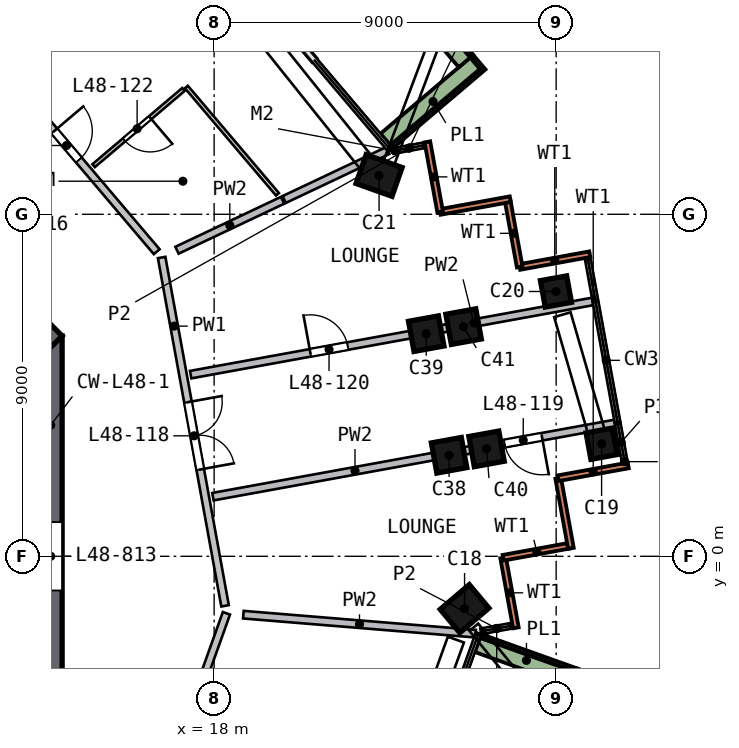
"""IFC4 building model, lengths in metres.
Left out: names, types, materials, properties, quantities, classifications, styles, units other than length and angle.
Written with IfcOpenShell. Run it as: python <this file> out.ifc"""

import sys

from ifc_helpers import new_model, si_unit, direction, frame, frame_2d, origin, origin_2d, place, context, subcontext, project, spatial, rectangle, extrude, element, fill, save


model = new_model("IFC4")
c1 = context("Model", 3, precision=1e-05, world=origin(), true_north=direction((0.0, 1.0)))
c2 = subcontext(c1, "Body", "Model", "MODEL_VIEW")
j1 = project(units=[si_unit("LENGTHUNIT", "METRE"), si_unit("PLANEANGLEUNIT", "RADIAN")], contexts=[c1])
p1 = place(None, origin())
s1 = spatial("IfcSite", under=j1, at=p1, CompositionType="ELEMENT")
p2 = place(p1, origin())
s2 = spatial("IfcBuilding", under=s1, at=p2, CompositionType="ELEMENT")
p3 = place(p2, frame((0.0, 0.0, 197.5)))
s3 = spatial("IfcBuildingStorey", under=s2, at=p3, CompositionType="ELEMENT", Elevation=197.5)
p4 = place(p3, frame((24.582, -1.521, 0.0), z_axis=(0.006232678, 0.116900718, 0.993124049), x_axis=(-0.764322175, -0.639838763, 0.080112233)))
e1 = element("IfcColumn", 1, at=p4, inside=s3, PredefinedType="COLUMN", context=c2, shape_type="SweptSolid", body=[
    extrude(rectangle(XDim=1.0, YDim=0.8, at=origin_2d()), origin(), (0.0, 0.0, 1.0), 3.212),
])
p5 = place(p3, frame((28.213, 2.8, 0.0), z_axis=(-0.014333646, 0.133704853, 0.990917534), x_axis=(-0.178356064, 0.974784174, -0.134107898)))
e2 = element("IfcColumn", 2, at=p5, inside=s3, PredefinedType="COLUMN", context=c2, shape_type="SweptSolid", body=[
    extrude(rectangle(XDim=0.7, YDim=0.7, at=origin_2d()), origin(), (0.0, 0.0, 1.0), 3.219),
])
p6 = place(p3, frame((27.035, 6.813, 0.0), z_axis=(-0.033455127, 0.127979135, 0.991212437), x_axis=(-0.176699521, 0.975386965, -0.131899763)))
e3 = element("IfcColumn", 3, at=p6, inside=s3, PredefinedType="COLUMN", context=c2, shape_type="SweptSolid", body=[
    extrude(rectangle(XDim=0.7, YDim=0.7, at=origin_2d()), origin(), (0.0, 0.0, 1.0), 3.218),
])
p7 = place(p3, frame((22.398, 9.893, 0.0), z_axis=(-0.047964708, 0.106115266, 0.993196324), x_axis=(0.940870573, -0.329039999, 0.080593079)))
e4 = element("IfcColumn", 4, at=p7, inside=s3, PredefinedType="COLUMN", context=c2, shape_type="SweptSolid", body=[
    extrude(rectangle(XDim=1.0, YDim=0.8, at=origin_2d()), origin(), (0.0, 0.0, 1.0), 3.212),
])
for number, where, z_axis, x_axis in (
    (5, (24.198, 2.519, 0.0), (-0.013, 0.115, 0.993), (0.984, 0.178, -0.008)),
    (6, (23.615, 5.723, 0.0), (-0.028, 0.112, 0.993), (0.984, 0.18, 0.008)),
):
    element("IfcColumn", number, at=place(p3, frame(where, z_axis=z_axis, x_axis=x_axis)), inside=s3, PredefinedType="COLUMN", context=c2, shape_type="SweptSolid", body=[
        extrude(rectangle(XDim=0.8, YDim=0.8, at=origin_2d()), origin(), (0.0, 0.0, 1.0), 3.211),
    ])
p8 = place(p3, frame((25.185, 2.682, 0.0), z_axis=(-0.013751888, 0.11966422, 0.992719175), x_axis=(0.983970963, 0.17815613, -0.007844571)))
e7 = element("IfcColumn", 7, at=p8, inside=s3, PredefinedType="COLUMN", context=c2, shape_type="SweptSolid", body=[
    extrude(rectangle(XDim=0.8, YDim=0.8, at=origin_2d()), origin(), (0.0, 0.0, 1.0), 3.213),
])
p9 = place(p3, frame((24.599, 5.902, 0.0), z_axis=(-0.029024263, 0.116628912, 0.992751373), x_axis=(0.983622156, 0.180082416, 0.007601191)))
e8 = element("IfcColumn", 8, at=p9, inside=s3, PredefinedType="COLUMN", context=c2, shape_type="SweptSolid", body=[
    extrude(rectangle(XDim=0.8, YDim=0.8, at=origin_2d()), origin(), (0.0, 0.0, 1.0), 3.213),
])
p10 = place(p3, frame((13.7, -5.799, 0.0), z_axis=(0.0, 0.0, 1.0), x_axis=(0.0, 1.0, 0.0)))
e9 = element("IfcWall", 9, at=p10, inside=s3, PredefinedType="SHEAR", context=c2, shape_type="SweptSolid", body=[
    extrude(rectangle(XDim=11.598, YDim=0.6, at=frame_2d((5.799, 0.0))), origin(), (0.0, 0.0, 1.0), 3.5),
])
p11 = place(p10, frame((4.899, 0.0, 0.0)))
e10 = element("IfcOpeningElement", 10, at=p11, cuts=e9, PredefinedType="OPENING", context=c2, shape_type="SweptSolid", body=[
    extrude(rectangle(XDim=1.8, YDim=2.1, at=frame_2d((0.9, 1.05))), frame((0.0, 0.31, 0.0), z_axis=(0.0, -1.0, 0.0), x_axis=(1.0, 0.0, 0.0)), (0.0, 0.0, 1.0), 0.62),
])
p12 = place(p3, frame((13.788, 5.587, 0.0), z_axis=(0.0, 0.0, 1.0), x_axis=(-0.707106781, 0.707106781, 0.0)))
e11 = element("IfcWall", 11, at=p12, inside=s3, PredefinedType="SHEAR", context=c2, shape_type="SweptSolid", body=[
    extrude(rectangle(XDim=11.598, YDim=0.6, at=frame_2d((5.799, 0.0))), origin(), (0.0, 0.0, 1.0), 3.5),
])
p13 = place(p12, frame((2.099, 0.0, 0.0)))
e12 = element("IfcOpeningElement", 12, at=p13, cuts=e11, PredefinedType="OPENING", context=c2, shape_type="SweptSolid", body=[
    extrude(rectangle(XDim=1.2, YDim=2.1, at=frame_2d((0.6, 1.05))), frame((0.0, 0.31, 0.0), z_axis=(0.0, -1.0, 0.0), x_axis=(1.0, 0.0, 0.0)), (0.0, 0.0, 1.0), 0.62),
])
p14 = place(p3, frame((25.94, -1.883, 0.0), z_axis=(0.0, 0.0, 1.0), x_axis=(-0.179160422, 0.983819873, 0.0)))
e13 = element("IfcWall", 13, at=p14, inside=s3, PredefinedType="SOLIDWALL", context=c2, shape_type="SweptSolid", body=[
    extrude(rectangle(XDim=1.875, YDim=0.15, at=frame_2d((0.938, 0.0))), origin(), (0.0, 0.0, 1.0), 3.19),
])
p15 = place(p3, frame((25.604, -0.039, 0.0), z_axis=(0.0, 0.0, 1.0), x_axis=(0.983839511, 0.179052551, 0.0)))
e14 = element("IfcWall", 14, at=p15, inside=s3, PredefinedType="SOLIDWALL", context=c2, shape_type="SweptSolid", body=[
    extrude(rectangle(XDim=1.8, YDim=0.15, at=frame_2d((0.9, 0.0))), origin(), (0.0, 0.0, 1.0), 3.19),
])
p16 = place(p3, frame((27.389, 0.21, 0.0), z_axis=(0.0, 0.0, 1.0), x_axis=(-0.179034393, 0.983842816, 0.0)))
e15 = element("IfcWall", 15, at=p16, inside=s3, PredefinedType="SOLIDWALL", context=c2, shape_type="SweptSolid", body=[
    extrude(rectangle(XDim=1.875, YDim=0.15, at=frame_2d((0.938, 0.0))), origin(), (0.0, 0.0, 1.0), 3.19),
])
p17 = place(p3, frame((27.053, 2.055, 0.0), z_axis=(0.0, 0.0, 1.0), x_axis=(0.983815693, 0.179183374, 0.0)))
e16 = element("IfcWall", 16, at=p17, inside=s3, PredefinedType="SOLIDWALL", context=c2, shape_type="SweptSolid", body=[
    extrude(rectangle(XDim=1.875, YDim=0.15, at=frame_2d((0.938, 0.0))), origin(), (0.0, 0.0, 1.0), 3.19),
])
p18 = place(p3, frame((27.885, 7.949, 0.0), z_axis=(0.0, 0.0, 1.0), x_axis=(-0.983819873, -0.179160422, 0.0)))
e17 = element("IfcWall", 17, at=p18, inside=s3, PredefinedType="SOLIDWALL", context=c2, shape_type="SweptSolid", body=[
    extrude(rectangle(XDim=1.875, YDim=0.15, at=frame_2d((0.938, 0.0))), origin(), (0.0, 0.0, 1.0), 3.19),
])
p19 = place(p3, frame((26.041, 7.613, 0.0), z_axis=(0.0, 0.0, 1.0), x_axis=(-0.179183844, 0.983815608, 0.0)))
e18 = element("IfcWall", 18, at=p19, inside=s3, PredefinedType="SOLIDWALL", context=c2, shape_type="SweptSolid", body=[
    extrude(rectangle(XDim=1.8, YDim=0.15, at=frame_2d((0.9, 0.0))), origin(), (0.0, 0.0, 1.0), 3.19),
])
p20 = place(p3, frame((25.792, 9.397, 0.0), z_axis=(0.0, 0.0, 1.0), x_axis=(-0.983842816, -0.179034393, 0.0)))
e19 = element("IfcWall", 19, at=p20, inside=s3, PredefinedType="SOLIDWALL", context=c2, shape_type="SweptSolid", body=[
    extrude(rectangle(XDim=1.875, YDim=0.15, at=frame_2d((0.938, 0.0))), origin(), (0.0, 0.0, 1.0), 3.19),
])
p21 = place(p3, frame((23.947, 9.062, 0.0), z_axis=(0.0, 0.0, 1.0), x_axis=(-0.179057331, 0.983838641, 0.0)))
e20 = element("IfcWall", 20, at=p21, inside=s3, PredefinedType="SOLIDWALL", context=c2, shape_type="SweptSolid", body=[
    extrude(rectangle(XDim=1.875, YDim=0.15, at=frame_2d((0.938, 0.0))), origin(), (0.0, 0.0, 1.0), 3.19),
])
p22 = place(p3, frame((20.638, 13.056, 0.0), z_axis=(0.0, 0.0, 1.0), x_axis=(-0.647052089, 0.762445797, 0.0)))
e21 = element("IfcWall", 21, at=p22, inside=s3, PredefinedType="SOLIDWALL", context=c2, shape_type="SweptSolid", body=[
    extrude(rectangle(XDim=3.4, YDim=0.15, at=frame_2d((1.7, 0.0))), origin(), (0.0, 0.0, 1.0), 2.475),
])
p23 = place(p22, frame((0.4, 0.0, 0.0)))
e22 = element("IfcOpeningElement", 22, at=p23, cuts=e21, PredefinedType="OPENING", context=c2, shape_type="SweptSolid", body=[
    extrude(rectangle(XDim=2.4, YDim=2.4, at=frame_2d((1.2, 1.2))), frame((0.0, 0.085, 0.0), z_axis=(0.0, -1.0, 0.0), x_axis=(1.0, 0.0, 0.0)), (0.0, 0.0, 1.0), 0.17),
])
p24 = place(p3, frame((27.489, -3.194, 0.0), z_axis=(0.0, 0.0, 1.0), x_axis=(-0.94159448, 0.336748919, 0.0)))
e23 = element("IfcWall", 23, at=p24, inside=s3, PredefinedType="SOLIDWALL", context=c2, shape_type="SweptSolid", body=[
    extrude(rectangle(XDim=2.699, YDim=0.5, at=frame_2d((1.35, 0.0))), origin(), (0.0, 0.0, 1.0), 0.7),
])
p25 = place(p3, frame((22.541, 10.932, 0.0), z_axis=(0.0, 0.0, 1.0), x_axis=(0.762447521, 0.647050058, 0.0)))
e24 = element("IfcWall", 24, at=p25, inside=s3, PredefinedType="SOLIDWALL", context=c2, shape_type="SweptSolid", body=[
    extrude(rectangle(XDim=3.199, YDim=0.5, at=frame_2d((1.6, 0.0))), origin(), (0.0, 0.0, 1.0), 0.7),
])
p26 = place(p3, frame((24.627, 13.031, 0.0), z_axis=(0.0, 0.0, 1.0), x_axis=(-0.647062996, 0.762436541, 0.0)))
e25 = element("IfcWall", 25, at=p26, inside=s3, PredefinedType="SOLIDWALL", context=c2, shape_type="SweptSolid", body=[
    extrude(rectangle(XDim=13.223, YDim=0.5, at=frame_2d((6.612, 0.0))), origin(), (0.0, 0.0, 1.0), 0.7),
])
p27 = place(p3, frame((10.461, 15.118, 0.0), z_axis=(0.0, 0.0, 1.0), x_axis=(0.647056399, -0.76244214, 0.0)))
e26 = element("IfcWall", 26, at=p27, inside=s3, PredefinedType="SOLIDWALL", context=c2, shape_type="SweptSolid", body=[
    extrude(rectangle(XDim=9.316, YDim=0.2, at=frame_2d((4.658, 0.0))), origin(), (0.0, 0.0, 1.0), 3.19),
])
p28 = place(p27, frame((5.15, 0.0, 0.0)))
e27 = element("IfcOpeningElement", 27, at=p28, cuts=e26, PredefinedType="OPENING", context=c2, shape_type="SweptSolid", body=[
    extrude(rectangle(XDim=1.0, YDim=2.1, at=frame_2d((0.5, 1.05))), frame((0.0, 0.11, 0.0), z_axis=(0.0, -1.0, 0.0), x_axis=(1.0, 0.0, 0.0)), (0.0, 0.0, 1.0), 0.22),
])
p29 = place(p3, frame((18.323, -1.5, 0.0), z_axis=(0.0, 0.0, 1.0), x_axis=(-0.336758012, -0.941591228, 0.0)))
e28 = element("IfcWall", 28, at=p29, inside=s3, PredefinedType="SOLIDWALL", context=c2, shape_type="SweptSolid", body=[
    extrude(rectangle(XDim=9.317, YDim=0.2, at=frame_2d((4.658, 0.0))), origin(), (0.0, 0.0, 1.0), 3.19),
])
p30 = place(p29, frame((5.15, 0.0, 0.0)))
e29 = element("IfcOpeningElement", 29, at=p30, cuts=e28, PredefinedType="OPENING", context=c2, shape_type="SweptSolid", body=[
    extrude(rectangle(XDim=1.0, YDim=2.1, at=frame_2d((0.5, 1.05))), frame((0.0, 0.11, 0.0), z_axis=(0.0, -1.0, 0.0), x_axis=(1.0, 0.0, 0.0)), (0.0, 0.0, 1.0), 0.22),
])
p31 = place(p3, frame((16.619, 7.863, 0.0), z_axis=(0.0, 0.0, 1.0), x_axis=(0.179134481, -0.983824597, 0.0)))
e30 = element("IfcWall", 30, at=p31, inside=s3, PredefinedType="SOLIDWALL", context=c2, shape_type="SweptSolid", body=[
    extrude(rectangle(XDim=9.317, YDim=0.2, at=frame_2d((4.658, 0.0))), origin(), (0.0, 0.0, 1.0), 3.19),
])
p32 = place(p31, frame((3.869, 0.0, 0.0)))
e31 = element("IfcOpeningElement", 31, at=p32, cuts=e30, PredefinedType="OPENING", context=c2, shape_type="SweptSolid", body=[
    extrude(rectangle(XDim=1.8, YDim=2.1, at=frame_2d((0.9, 1.05))), frame((0.0, 0.11, 0.0), z_axis=(0.0, -1.0, 0.0), x_axis=(1.0, 0.0, 0.0)), (0.0, 0.0, 1.0), 0.22),
])
p33 = place(p3, frame((17.023, 8.054, 0.0), z_axis=(0.0, 0.0, 1.0), x_axis=(0.903934995, 0.427669877, 0.0)))
e32 = element("IfcWall", 32, at=p33, inside=s3, PredefinedType="SOLIDWALL", context=c2, shape_type="SweptSolid", body=[
    extrude(rectangle(XDim=3.075, YDim=0.2, at=frame_2d((1.537, 0.0))), origin(), (0.0, 0.0, 1.0), 3.19),
])
p34 = place(p3, frame((19.844, 9.389, 0.0), z_axis=(0.0, 0.0, 1.0), x_axis=(0.90394408, 0.427650675, 0.0)))
e33 = element("IfcWall", 33, at=p34, inside=s3, PredefinedType="SOLIDWALL", context=c2, shape_type="SweptSolid", body=[
    extrude(rectangle(XDim=3.011, YDim=0.2, at=frame_2d((1.506, 0.0))), origin(), (0.0, 0.0, 1.0), 3.19),
])
p35 = place(p3, frame((24.881, -2.037, 0.0), z_axis=(0.0, 0.0, 1.0), x_axis=(-0.996666868, 0.081579132, 0.0)))
e34 = element("IfcWall", 34, at=p35, inside=s3, PredefinedType="SOLIDWALL", context=c2, shape_type="SweptSolid", body=[
    extrude(rectangle(XDim=6.132, YDim=0.2, at=frame_2d((3.066, 0.0))), origin(), (0.0, 0.0, 1.0), 3.19),
])
p36 = place(p3, frame((17.383, 4.781, 0.0), z_axis=(0.0, 0.0, 1.0), x_axis=(0.983822637, 0.179145247, 0.0)))
e35 = element("IfcWall", 35, at=p36, inside=s3, PredefinedType="SOLIDWALL", context=c2, shape_type="SweptSolid", body=[
    extrude(rectangle(XDim=10.75, YDim=0.2, at=frame_2d((5.375, 0.0))), origin(), (0.0, 0.0, 1.0), 3.19),
])
p37 = place(p36, frame((3.2, 0.0, 0.0)))
e36 = element("IfcOpeningElement", 36, at=p37, cuts=e35, PredefinedType="OPENING", context=c2, shape_type="SweptSolid", body=[
    extrude(rectangle(XDim=1.0, YDim=2.1, at=frame_2d((0.5, 1.05))), frame((0.0, 0.11, 0.0), z_axis=(0.0, -1.0, 0.0), x_axis=(1.0, 0.0, 0.0)), (0.0, 0.0, 1.0), 0.22),
])
p38 = place(p3, frame((28.544, 3.494, 0.0), z_axis=(0.0, 0.0, 1.0), x_axis=(-0.983823366, -0.179141244, 0.0)))
e37 = element("IfcWall", 37, at=p38, inside=s3, PredefinedType="SOLIDWALL", context=c2, shape_type="SweptSolid", body=[
    extrude(rectangle(XDim=10.75, YDim=0.2, at=frame_2d((5.375, 0.0))), origin(), (0.0, 0.0, 1.0), 3.19),
])
p39 = place(p38, frame((1.95, 0.0, 0.0)))
e38 = element("IfcOpeningElement", 38, at=p39, cuts=e37, PredefinedType="OPENING", context=c2, shape_type="SweptSolid", body=[
    extrude(rectangle(XDim=1.0, YDim=2.1, at=frame_2d((0.5, 1.05))), frame((0.0, 0.11, 0.0), z_axis=(0.0, -1.0, 0.0), x_axis=(1.0, 0.0, 0.0)), (0.0, 0.0, 1.0), 0.22),
])
p40 = place(p3, frame((17.194, 12.285, 0.0), z_axis=(0.0, 0.0, 1.0), x_axis=(-0.762432611, -0.647067627, 0.0)))
e39 = element("IfcWall", 39, at=p40, inside=s3, PredefinedType="PARTITIONING", context=c2, shape_type="SweptSolid", body=[
    extrude(rectangle(XDim=3.1, YDim=0.1, at=frame_2d((1.55, 0.0))), origin(), (0.0, 0.0, 1.0), 3.19),
])
p41 = place(p40, frame((1.15, 0.0, 0.0)))
e40 = element("IfcOpeningElement", 40, at=p41, cuts=e39, PredefinedType="OPENING", context=c2, shape_type="SweptSolid", body=[
    extrude(rectangle(XDim=0.9, YDim=2.1, at=frame_2d((0.45, 1.05))), frame((0.0, 0.06, 0.0), z_axis=(0.0, -1.0, 0.0), x_axis=(1.0, 0.0, 0.0)), (0.0, 0.0, 1.0), 0.12),
])
p42 = place(p3, frame((17.27, 12.35, 0.0), z_axis=(0.0, 0.0, 1.0), x_axis=(0.647043638, -0.76245297, 0.0)))
e41 = element("IfcWall", 41, at=p42, inside=s3, PredefinedType="PARTITIONING", context=c2, shape_type="SweptSolid", body=[
    extrude(rectangle(XDim=3.704, YDim=0.1, at=frame_2d((1.852, 0.0))), origin(), (0.0, 0.0, 1.0), 3.19),
])
p43 = place(p32, origin())
e42 = element("IfcDoor", 42, at=p43, inside=s3, OperationType="DOUBLE_DOOR_SINGLE_SWING", PredefinedType="DOOR", context=c2, shape_type="SweptSolid", body=[
    extrude(rectangle(XDim=1.8, YDim=2.1, at=frame_2d((0.9, 1.05))), frame((0.0, 0.025, 0.0), z_axis=(0.0, -1.0, 0.0), x_axis=(1.0, 0.0, 0.0)), (0.0, 0.0, 1.0), 0.05),
])
fill(e31, e42)
p44 = place(p39, origin())
e43 = element("IfcDoor", 43, at=p44, inside=s3, OperationType="SINGLE_SWING_LEFT", PredefinedType="DOOR", context=c2, shape_type="SweptSolid", body=[
    extrude(rectangle(XDim=1.0, YDim=2.1, at=frame_2d((0.5, 1.05))), frame((0.0, 0.025, 0.0), z_axis=(0.0, -1.0, 0.0), x_axis=(1.0, 0.0, 0.0)), (0.0, 0.0, 1.0), 0.05),
])
fill(e38, e43)
p45 = place(p37, origin())
e44 = element("IfcDoor", 44, at=p45, inside=s3, OperationType="SINGLE_SWING_LEFT", PredefinedType="DOOR", context=c2, shape_type="SweptSolid", body=[
    extrude(rectangle(XDim=1.0, YDim=2.1, at=frame_2d((0.5, 1.05))), frame((0.0, 0.025, 0.0), z_axis=(0.0, -1.0, 0.0), x_axis=(1.0, 0.0, 0.0)), (0.0, 0.0, 1.0), 0.05),
])
fill(e36, e44)
p46 = place(p28, origin())
e45 = element("IfcDoor", 45, at=p46, inside=s3, OperationType="SINGLE_SWING_LEFT", PredefinedType="DOOR", context=c2, shape_type="SweptSolid", body=[
    extrude(rectangle(XDim=1.0, YDim=2.1, at=frame_2d((0.5, 1.05))), frame((0.0, 0.025, 0.0), z_axis=(0.0, -1.0, 0.0), x_axis=(1.0, 0.0, 0.0)), (0.0, 0.0, 1.0), 0.05),
])
fill(e27, e45)
p47 = place(p41, origin())
e46 = element("IfcDoor", 46, at=p47, inside=s3, OperationType="SINGLE_SWING_LEFT", PredefinedType="DOOR", context=c2, shape_type="SweptSolid", body=[
    extrude(rectangle(XDim=0.9, YDim=2.1, at=frame_2d((0.45, 1.05))), frame((0.0, 0.025, 0.0), z_axis=(0.0, -1.0, 0.0), x_axis=(1.0, 0.0, 0.0)), (0.0, 0.0, 1.0), 0.05),
])
fill(e40, e46)
save(model, sys.argv[1])
